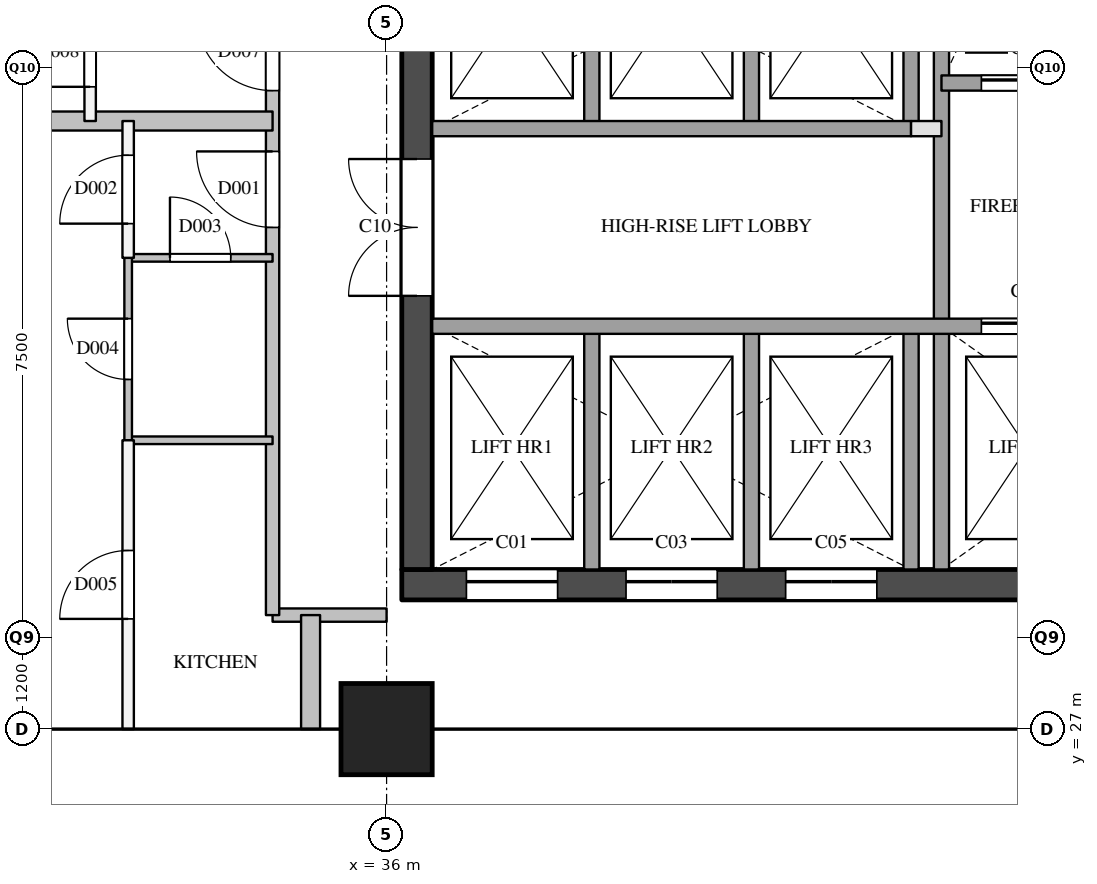
"""IFC4 building model, lengths in metres.
Left out: names, types, materials, properties, quantities, classifications, styles, units other than length and angle.
Written with IfcOpenShell. Run it as: python <this file> out.ifc"""

import sys

from ifc_helpers import new_model, si_unit, direction, frame, frame_2d, origin, origin_2d, place, context, subcontext, project, spatial, rectangle, extrude, element, fill, save


model = new_model("IFC4")
c1 = context("Model", 3, precision=1e-05, world=origin(), true_north=direction((0.0, 1.0)))
c2 = subcontext(c1, "Body", "Model", "MODEL_VIEW")
j1 = project(units=[si_unit("LENGTHUNIT", "METRE"), si_unit("PLANEANGLEUNIT", "RADIAN")], contexts=[c1])
p1 = place(None, origin())
s1 = spatial("IfcSite", under=j1, at=p1, CompositionType="ELEMENT")
p2 = place(p1, origin())
s2 = spatial("IfcBuilding", under=s1, at=p2, CompositionType="ELEMENT")
p3 = place(p2, frame((0.0, 0.0, 234.5)))
s3 = spatial("IfcBuildingStorey", under=s2, at=p3, CompositionType="ELEMENT", Elevation=234.5)
p4 = place(p3, frame((36.0, 27.0, 0.0), z_axis=(0.0, 0.0, 1.0), x_axis=(1.0, 0.0, 0.0)))
e1 = element("IfcColumn", 1, at=p4, inside=s3, PredefinedType="COLUMN", context=c2, shape_type="SweptSolid", body=[
    extrude(rectangle(XDim=1.2, YDim=1.2, at=origin_2d()), origin(), (0.0, 0.0, 1.0), 3.9),
])
p5 = place(p3, frame((36.2, 28.9, 0.0), z_axis=(0.0, 0.0, 1.0), x_axis=(1.0, 0.0, 0.0)))
e2 = element("IfcWall", 2, at=p5, inside=s3, PredefinedType="SHEAR", context=c2, shape_type="SweptSolid", body=[
    extrude(rectangle(XDim=12.0, YDim=0.4, at=frame_2d((6.0, 0.0))), origin(), (0.0, 0.0, 1.0), 3.6),
])
p6 = place(p5, frame((0.85, 0.0, 0.0)))
e3 = element("IfcOpeningElement", 3, at=p6, cuts=e2, PredefinedType="OPENING", context=c2, shape_type="SweptSolid", body=[
    extrude(rectangle(XDim=1.2, YDim=2.1, at=frame_2d((0.6, 1.05))), frame((0.0, 0.21, 0.0), z_axis=(0.0, -1.0, 0.0), x_axis=(1.0, 0.0, 0.0)), (0.0, 0.0, 1.0), 0.42),
])
p7 = place(p5, frame((2.95, 0.0, 0.0)))
e4 = element("IfcOpeningElement", 4, at=p7, cuts=e2, PredefinedType="OPENING", context=c2, shape_type="SweptSolid", body=[
    extrude(rectangle(XDim=1.2, YDim=2.1, at=frame_2d((0.6, 1.05))), frame((0.0, 0.21, 0.0), z_axis=(0.0, -1.0, 0.0), x_axis=(1.0, 0.0, 0.0)), (0.0, 0.0, 1.0), 0.42),
])
p8 = place(p5, frame((5.05, 0.0, 0.0)))
e5 = element("IfcOpeningElement", 5, at=p8, cuts=e2, PredefinedType="OPENING", context=c2, shape_type="SweptSolid", body=[
    extrude(rectangle(XDim=1.2, YDim=2.1, at=frame_2d((0.6, 1.05))), frame((0.0, 0.21, 0.0), z_axis=(0.0, -1.0, 0.0), x_axis=(1.0, 0.0, 0.0)), (0.0, 0.0, 1.0), 0.42),
])
p9 = place(p3, frame((36.4, 29.1, 0.0), z_axis=(0.0, 0.0, 1.0), x_axis=(0.0, 1.0, 0.0)))
e6 = element("IfcWall", 6, at=p9, inside=s3, PredefinedType="SHEAR", context=c2, shape_type="SweptSolid", body=[
    extrude(rectangle(XDim=20.3, YDim=0.4, at=frame_2d((10.15, 0.0))), origin(), (0.0, 0.0, 1.0), 3.6),
])
p10 = place(p9, frame((3.6, 0.0, 0.0)))
e7 = element("IfcOpeningElement", 7, at=p10, cuts=e6, PredefinedType="OPENING", context=c2, shape_type="SweptSolid", body=[
    extrude(rectangle(XDim=1.8, YDim=2.1, at=frame_2d((0.9, 1.05))), frame((0.0, 0.21, 0.0), z_axis=(0.0, -1.0, 0.0), x_axis=(1.0, 0.0, 0.0)), (0.0, 0.0, 1.0), 0.42),
])
p11 = place(p9, frame((16.4, 0.0, 0.0)))
e8 = element("IfcOpeningElement", 8, at=p11, cuts=e6, PredefinedType="OPENING", context=c2, shape_type="SweptSolid", body=[
    extrude(rectangle(XDim=1.0, YDim=2.1, at=frame_2d((0.5, 1.05))), frame((0.0, 0.21, 0.0), z_axis=(0.0, -1.0, 0.0), x_axis=(1.0, 0.0, 0.0)), (0.0, 0.0, 1.0), 0.42),
])
p12 = place(p3, frame((38.7, 29.1, 0.0), z_axis=(0.0, 0.0, 1.0), x_axis=(0.0, 1.0, 0.0)))
e9 = element("IfcWall", 9, at=p12, inside=s3, PredefinedType="SOLIDWALL", context=c2, shape_type="SweptSolid", body=[
    extrude(rectangle(XDim=3.2, YDim=0.2, at=frame_2d((1.6, 0.0))), origin(), (0.0, 0.0, 1.0), 3.6),
])
p13 = place(p3, frame((38.7, 34.9, 0.0), z_axis=(0.0, 0.0, 1.0), x_axis=(0.0, 1.0, 0.0)))
e10 = element("IfcWall", 10, at=p13, inside=s3, PredefinedType="SOLIDWALL", context=c2, shape_type="SweptSolid", body=[
    extrude(rectangle(XDim=3.2, YDim=0.2, at=frame_2d((1.6, 0.0))), origin(), (0.0, 0.0, 1.0), 3.6),
])
p14 = place(p3, frame((40.8, 29.1, 0.0), z_axis=(0.0, 0.0, 1.0), x_axis=(0.0, 1.0, 0.0)))
e11 = element("IfcWall", 11, at=p14, inside=s3, PredefinedType="SOLIDWALL", context=c2, shape_type="SweptSolid", body=[
    extrude(rectangle(XDim=3.2, YDim=0.2, at=frame_2d((1.6, 0.0))), origin(), (0.0, 0.0, 1.0), 3.6),
])
p15 = place(p3, frame((40.8, 34.9, 0.0), z_axis=(0.0, 0.0, 1.0), x_axis=(0.0, 1.0, 0.0)))
e12 = element("IfcWall", 12, at=p15, inside=s3, PredefinedType="SOLIDWALL", context=c2, shape_type="SweptSolid", body=[
    extrude(rectangle(XDim=3.2, YDim=0.2, at=frame_2d((1.6, 0.0))), origin(), (0.0, 0.0, 1.0), 3.6),
])
p16 = place(p3, frame((42.9, 29.1, 0.0), z_axis=(0.0, 0.0, 1.0), x_axis=(0.0, 1.0, 0.0)))
e13 = element("IfcWall", 13, at=p16, inside=s3, PredefinedType="SOLIDWALL", context=c2, shape_type="SweptSolid", body=[
    extrude(rectangle(XDim=3.2, YDim=0.2, at=frame_2d((1.6, 0.0))), origin(), (0.0, 0.0, 1.0), 3.6),
])
p17 = place(p3, frame((42.9, 34.9, 0.0), z_axis=(0.0, 0.0, 1.0), x_axis=(0.0, 1.0, 0.0)))
e14 = element("IfcWall", 14, at=p17, inside=s3, PredefinedType="SOLIDWALL", context=c2, shape_type="SweptSolid", body=[
    extrude(rectangle(XDim=3.2, YDim=0.2, at=frame_2d((1.6, 0.0))), origin(), (0.0, 0.0, 1.0), 3.6),
])
p18 = place(p3, frame((43.3, 29.1, 0.0), z_axis=(0.0, 0.0, 1.0), x_axis=(0.0, 1.0, 0.0)))
e15 = element("IfcWall", 15, at=p18, inside=s3, PredefinedType="SOLIDWALL", context=c2, shape_type="SweptSolid", body=[
    extrude(rectangle(XDim=9.9, YDim=0.2, at=frame_2d((4.95, 0.0))), origin(), (0.0, 0.0, 1.0), 3.6),
])
p19 = place(p3, frame((36.6, 32.3, 0.0), z_axis=(0.0, 0.0, 1.0), x_axis=(1.0, 0.0, 0.0)))
e16 = element("IfcWall", 16, at=p19, inside=s3, PredefinedType="SOLIDWALL", context=c2, shape_type="SweptSolid", body=[
    extrude(rectangle(XDim=11.2, YDim=0.2, at=frame_2d((5.6, 0.0))), origin(), (0.0, 0.0, 1.0), 3.6),
])
p20 = place(p19, frame((7.225, 0.0, 0.0)))
e17 = element("IfcOpeningElement", 17, at=p20, cuts=e16, PredefinedType="OPENING", context=c2, shape_type="SweptSolid", body=[
    extrude(rectangle(XDim=1.2, YDim=2.1, at=frame_2d((0.6, 1.05))), frame((0.0, 0.11, 0.0), z_axis=(0.0, -1.0, 0.0), x_axis=(1.0, 0.0, 0.0)), (0.0, 0.0, 1.0), 0.22),
])
p21 = place(p19, frame((9.475, 0.0, 0.0)))
e18 = element("IfcOpeningElement", 18, at=p21, cuts=e16, PredefinedType="OPENING", context=c2, shape_type="SweptSolid", body=[
    extrude(rectangle(XDim=1.2, YDim=2.1, at=frame_2d((0.6, 1.05))), frame((0.0, 0.11, 0.0), z_axis=(0.0, -1.0, 0.0), x_axis=(1.0, 0.0, 0.0)), (0.0, 0.0, 1.0), 0.22),
])
p22 = place(p3, frame((42.9, 34.9, 0.0), z_axis=(0.0, 0.0, 1.0), x_axis=(1.0, 0.0, 0.0)))
e19 = element("IfcWall", 19, at=p22, inside=s3, PredefinedType="PARTITIONING", context=c2, shape_type="SweptSolid", body=[
    extrude(rectangle(XDim=0.4, YDim=0.2, at=frame_2d((0.2, 0.0))), origin(), (0.0, 0.0, 1.0), 3.6),
])
p23 = place(p3, frame((36.6, 34.9, 0.0), z_axis=(0.0, 0.0, 1.0), x_axis=(1.0, 0.0, 0.0)))
e20 = element("IfcWall", 20, at=p23, inside=s3, PredefinedType="SOLIDWALL", context=c2, shape_type="SweptSolid", body=[
    extrude(rectangle(XDim=6.3, YDim=0.2, at=frame_2d((3.15, 0.0))), origin(), (0.0, 0.0, 1.0), 3.6),
])
p24 = place(p3, frame((43.3, 35.5, 0.0), z_axis=(0.0, 0.0, 1.0), x_axis=(1.0, 0.0, 0.0)))
e21 = element("IfcWall", 21, at=p24, inside=s3, PredefinedType="SOLIDWALL", context=c2, shape_type="SweptSolid", body=[
    extrude(rectangle(XDim=4.5, YDim=0.2, at=frame_2d((2.25, 0.0))), origin(), (0.0, 0.0, 1.0), 3.6),
])
p25 = place(p24, frame((0.525, 0.0, 0.0)))
e22 = element("IfcOpeningElement", 22, at=p25, cuts=e21, PredefinedType="OPENING", context=c2, shape_type="SweptSolid", body=[
    extrude(rectangle(XDim=1.2, YDim=2.1, at=frame_2d((0.6, 1.05))), frame((0.0, 0.11, 0.0), z_axis=(0.0, -1.0, 0.0), x_axis=(1.0, 0.0, 0.0)), (0.0, 0.0, 1.0), 0.22),
])
p26 = place(p24, frame((3.025, 0.0, 0.0)))
e23 = element("IfcOpeningElement", 23, at=p26, cuts=e21, PredefinedType="OPENING", context=c2, shape_type="SweptSolid", body=[
    extrude(rectangle(XDim=0.7, YDim=2.1, at=frame_2d((0.35, 1.05))), frame((0.0, 0.11, 0.0), z_axis=(0.0, -1.0, 0.0), x_axis=(1.0, 0.0, 0.0)), (0.0, 0.0, 1.0), 0.22),
])
p27 = place(p3, frame((34.5, 28.5, 0.0), z_axis=(0.0, 0.0, 1.0), x_axis=(1.0, 0.0, 0.0)))
e24 = element("IfcWall", 24, at=p27, inside=s3, PredefinedType="PARTITIONING", context=c2, shape_type="SweptSolid", body=[
    extrude(rectangle(XDim=1.5, YDim=0.175, at=frame_2d((0.75, 0.0))), origin(), (0.0, 0.0, 1.0), 3.6),
])
p28 = place(p3, frame((34.5, 28.5, 0.0), z_axis=(0.0, 0.0, 1.0), x_axis=(0.0, 1.0, 0.0)))
e25 = element("IfcWall", 25, at=p28, inside=s3, PredefinedType="PARTITIONING", context=c2, shape_type="SweptSolid", body=[
    extrude(rectangle(XDim=23.0, YDim=0.175, at=frame_2d((11.5, 0.0))), origin(), (0.0, 0.0, 1.0), 3.6),
])
p29 = place(p28, frame((5.1, 0.0, 0.0)))
e26 = element("IfcOpeningElement", 26, at=p29, cuts=e25, PredefinedType="OPENING", context=c2, shape_type="SweptSolid", body=[
    extrude(rectangle(XDim=1.0, YDim=2.1, at=frame_2d((0.5, 1.05))), frame((0.0, 0.097, 0.0), z_axis=(0.0, -1.0, 0.0), x_axis=(1.0, 0.0, 0.0)), (0.0, 0.0, 1.0), 0.195),
])
p30 = place(p28, frame((6.9, 0.0, 0.0)))
e27 = element("IfcOpeningElement", 27, at=p30, cuts=e25, PredefinedType="OPENING", context=c2, shape_type="SweptSolid", body=[
    extrude(rectangle(XDim=1.0, YDim=2.1, at=frame_2d((0.5, 1.05))), frame((0.0, 0.097, 0.0), z_axis=(0.0, -1.0, 0.0), x_axis=(1.0, 0.0, 0.0)), (0.0, 0.0, 1.0), 0.195),
])
p31 = place(p28, frame((16.9, 0.0, 0.0)))
e28 = element("IfcOpeningElement", 28, at=p31, cuts=e25, PredefinedType="OPENING", context=c2, shape_type="SweptSolid", body=[
    extrude(rectangle(XDim=1.0, YDim=2.1, at=frame_2d((0.5, 1.05))), frame((0.0, 0.097, 0.0), z_axis=(0.0, -1.0, 0.0), x_axis=(1.0, 0.0, 0.0)), (0.0, 0.0, 1.0), 0.195),
])
p32 = place(p3, frame((32.1, 35.0, 0.0), z_axis=(0.0, 0.0, 1.0), x_axis=(0.0, 1.0, 0.0)))
e29 = element("IfcWall", 29, at=p32, inside=s3, PredefinedType="PARTITIONING", context=c2, shape_type="SweptSolid", body=[
    extrude(rectangle(XDim=1.8, YDim=0.15, at=frame_2d((0.9, 0.0))), origin(), (0.0, 0.0, 1.0), 3.6),
])
p33 = place(p32, frame((0.45, 0.0, 0.0)))
e30 = element("IfcOpeningElement", 30, at=p33, cuts=e29, PredefinedType="OPENING", context=c2, shape_type="SweptSolid", body=[
    extrude(rectangle(XDim=0.9, YDim=2.1, at=frame_2d((0.45, 1.05))), frame((0.0, 0.085, 0.0), z_axis=(0.0, -1.0, 0.0), x_axis=(1.0, 0.0, 0.0)), (0.0, 0.0, 1.0), 0.17),
])
p34 = place(p3, frame((32.6, 27.0, 0.0), z_axis=(0.0, 0.0, 1.0), x_axis=(0.0, 1.0, 0.0)))
e31 = element("IfcWall", 31, at=p34, inside=s3, PredefinedType="PARTITIONING", context=c2, shape_type="SweptSolid", body=[
    extrude(rectangle(XDim=3.8, YDim=0.15, at=frame_2d((1.9, 0.0))), origin(), (0.0, 0.0, 1.0), 2.6),
])
p35 = place(p34, frame((1.45, 0.0, 0.0)))
e32 = element("IfcOpeningElement", 32, at=p35, cuts=e31, PredefinedType="OPENING", context=c2, shape_type="SweptSolid", body=[
    extrude(rectangle(XDim=0.9, YDim=2.1, at=frame_2d((0.45, 1.05))), frame((0.0, 0.085, 0.0), z_axis=(0.0, -1.0, 0.0), x_axis=(1.0, 0.0, 0.0)), (0.0, 0.0, 1.0), 0.17),
])
p36 = place(p3, frame((32.6, 33.2, 0.0), z_axis=(0.0, 0.0, 1.0), x_axis=(0.0, 1.0, 0.0)))
e33 = element("IfcWall", 33, at=p36, inside=s3, PredefinedType="PARTITIONING", context=c2, shape_type="SweptSolid", body=[
    extrude(rectangle(XDim=1.8, YDim=0.15, at=frame_2d((0.9, 0.0))), origin(), (0.0, 0.0, 1.0), 3.6),
])
p37 = place(p36, frame((0.45, 0.0, 0.0)))
e34 = element("IfcOpeningElement", 34, at=p37, cuts=e33, PredefinedType="OPENING", context=c2, shape_type="SweptSolid", body=[
    extrude(rectangle(XDim=0.9, YDim=2.1, at=frame_2d((0.45, 1.05))), frame((0.0, 0.085, 0.0), z_axis=(0.0, -1.0, 0.0), x_axis=(1.0, 0.0, 0.0)), (0.0, 0.0, 1.0), 0.17),
])
p38 = place(p3, frame((18.0, 35.0, 0.0), z_axis=(0.0, 0.0, 1.0), x_axis=(1.0, 0.0, 0.0)))
e35 = element("IfcWall", 35, at=p38, inside=s3, PredefinedType="PARTITIONING", context=c2, shape_type="SweptSolid", body=[
    extrude(rectangle(XDim=16.5, YDim=0.25, at=frame_2d((8.25, 0.0))), origin(), (0.0, 0.0, 1.0), 2.6),
])
p39 = place(p3, frame((35.0, 27.0, 0.0), z_axis=(0.0, 0.0, 1.0), x_axis=(0.0, 1.0, 0.0)))
e36 = element("IfcWall", 36, at=p39, inside=s3, PredefinedType="PARTITIONING", context=c2, shape_type="SweptSolid", body=[
    extrude(rectangle(XDim=1.5, YDim=0.25, at=frame_2d((0.75, 0.0))), origin(), (0.0, 0.0, 1.0), 2.6),
])
p40 = place(p3, frame((32.6, 30.8, 0.0), z_axis=(0.0, 0.0, 1.0), x_axis=(1.0, 0.0, 0.0)))
e37 = element("IfcWall", 37, at=p40, inside=s3, PredefinedType="PARTITIONING", context=c2, shape_type="SweptSolid", body=[
    extrude(rectangle(XDim=1.9, YDim=0.1, at=frame_2d((0.95, 0.0))), origin(), (0.0, 0.0, 1.0), 3.6),
])
p41 = place(p3, frame((32.6, 33.2, 0.0), z_axis=(0.0, 0.0, 1.0), x_axis=(1.0, 0.0, 0.0)))
e38 = element("IfcWall", 38, at=p41, inside=s3, PredefinedType="PARTITIONING", context=c2, shape_type="SweptSolid", body=[
    extrude(rectangle(XDim=1.9, YDim=0.1, at=frame_2d((0.95, 0.0))), origin(), (0.0, 0.0, 1.0), 3.6),
])
p42 = place(p41, frame((0.55, 0.0, 0.0)))
e39 = element("IfcOpeningElement", 39, at=p42, cuts=e38, PredefinedType="OPENING", context=c2, shape_type="SweptSolid", body=[
    extrude(rectangle(XDim=0.8, YDim=2.1, at=frame_2d((0.4, 1.05))), frame((0.0, 0.06, 0.0), z_axis=(0.0, -1.0, 0.0), x_axis=(1.0, 0.0, 0.0)), (0.0, 0.0, 1.0), 0.12),
])
p43 = place(p3, frame((32.6, 30.8, 0.0), z_axis=(0.0, 0.0, 1.0), x_axis=(0.0, 1.0, 0.0)))
e40 = element("IfcWall", 40, at=p43, inside=s3, PredefinedType="PARTITIONING", context=c2, shape_type="SweptSolid", body=[
    extrude(rectangle(XDim=2.4, YDim=0.1, at=frame_2d((1.2, 0.0))), origin(), (0.0, 0.0, 1.0), 3.6),
])
p44 = place(p43, frame((0.8, 0.0, 0.0)))
e41 = element("IfcOpeningElement", 41, at=p44, cuts=e40, PredefinedType="OPENING", context=c2, shape_type="SweptSolid", body=[
    extrude(rectangle(XDim=0.8, YDim=2.1, at=frame_2d((0.4, 1.05))), frame((0.0, 0.06, 0.0), z_axis=(0.0, -1.0, 0.0), x_axis=(1.0, 0.0, 0.0)), (0.0, 0.0, 1.0), 0.12),
])
p45 = place(p6, origin())
e42 = element("IfcDoor", 42, at=p45, inside=s3, OperationType="SLIDING_TO_LEFT", PredefinedType="DOOR", context=c2, shape_type="SweptSolid", body=[
    extrude(rectangle(XDim=1.2, YDim=2.1, at=frame_2d((0.6, 1.05))), frame((0.0, 0.025, 0.0), z_axis=(0.0, -1.0, 0.0), x_axis=(1.0, 0.0, 0.0)), (0.0, 0.0, 1.0), 0.05),
])
fill(e3, e42)
p46 = place(p7, origin())
e43 = element("IfcDoor", 43, at=p46, inside=s3, OperationType="SLIDING_TO_LEFT", PredefinedType="DOOR", context=c2, shape_type="SweptSolid", body=[
    extrude(rectangle(XDim=1.2, YDim=2.1, at=frame_2d((0.6, 1.05))), frame((0.0, 0.025, 0.0), z_axis=(0.0, -1.0, 0.0), x_axis=(1.0, 0.0, 0.0)), (0.0, 0.0, 1.0), 0.05),
])
fill(e4, e43)
p47 = place(p8, origin())
e44 = element("IfcDoor", 44, at=p47, inside=s3, OperationType="SLIDING_TO_LEFT", PredefinedType="DOOR", context=c2, shape_type="SweptSolid", body=[
    extrude(rectangle(XDim=1.2, YDim=2.1, at=frame_2d((0.6, 1.05))), frame((0.0, 0.025, 0.0), z_axis=(0.0, -1.0, 0.0), x_axis=(1.0, 0.0, 0.0)), (0.0, 0.0, 1.0), 0.05),
])
fill(e5, e44)
p48 = place(p20, origin())
e45 = element("IfcDoor", 45, at=p48, inside=s3, OperationType="SLIDING_TO_LEFT", PredefinedType="DOOR", context=c2, shape_type="SweptSolid", body=[
    extrude(rectangle(XDim=1.2, YDim=2.1, at=frame_2d((0.6, 1.05))), frame((0.0, 0.025, 0.0), z_axis=(0.0, -1.0, 0.0), x_axis=(1.0, 0.0, 0.0)), (0.0, 0.0, 1.0), 0.05),
])
fill(e17, e45)
p49 = place(p25, origin())
e46 = element("IfcDoor", 46, at=p49, inside=s3, OperationType="SLIDING_TO_LEFT", PredefinedType="DOOR", context=c2, shape_type="SweptSolid", body=[
    extrude(rectangle(XDim=1.2, YDim=2.1, at=frame_2d((0.6, 1.05))), frame((0.0, 0.025, 0.0), z_axis=(0.0, -1.0, 0.0), x_axis=(1.0, 0.0, 0.0)), (0.0, 0.0, 1.0), 0.05),
])
fill(e22, e46)
p50 = place(p10, origin())
e47 = element("IfcDoor", 47, at=p50, inside=s3, OperationType="DOUBLE_DOOR_SINGLE_SWING", PredefinedType="DOOR", context=c2, shape_type="SweptSolid", body=[
    extrude(rectangle(XDim=1.8, YDim=2.1, at=frame_2d((0.9, 1.05))), frame((0.0, 0.025, 0.0), z_axis=(0.0, -1.0, 0.0), x_axis=(1.0, 0.0, 0.0)), (0.0, 0.0, 1.0), 0.05),
])
fill(e7, e47)
p51 = place(p29, origin())
e48 = element("IfcDoor", 48, at=p51, inside=s3, OperationType="SINGLE_SWING_RIGHT", PredefinedType="DOOR", context=c2, shape_type="SweptSolid", body=[
    extrude(rectangle(XDim=1.0, YDim=2.1, at=frame_2d((0.5, 1.05))), frame((0.0, 0.025, 0.0), z_axis=(0.0, -1.0, 0.0), x_axis=(1.0, 0.0, 0.0)), (0.0, 0.0, 1.0), 0.05),
])
fill(e26, e48)
p52 = place(p37, origin())
e49 = element("IfcDoor", 49, at=p52, inside=s3, OperationType="SINGLE_SWING_LEFT", PredefinedType="DOOR", context=c2, shape_type="SweptSolid", body=[
    extrude(rectangle(XDim=0.9, YDim=2.1, at=frame_2d((0.45, 1.05))), frame((0.0, 0.025, 0.0), z_axis=(0.0, -1.0, 0.0), x_axis=(1.0, 0.0, 0.0)), (0.0, 0.0, 1.0), 0.05),
])
fill(e34, e49)
p53 = place(p42, origin())
e50 = element("IfcDoor", 50, at=p53, inside=s3, OperationType="SINGLE_SWING_LEFT", PredefinedType="DOOR", context=c2, shape_type="SweptSolid", body=[
    extrude(rectangle(XDim=0.8, YDim=2.1, at=frame_2d((0.4, 1.05))), frame((0.0, 0.025, 0.0), z_axis=(0.0, -1.0, 0.0), x_axis=(1.0, 0.0, 0.0)), (0.0, 0.0, 1.0), 0.05),
])
fill(e39, e50)
p54 = place(p44, origin())
e51 = element("IfcDoor", 51, at=p54, inside=s3, OperationType="SINGLE_SWING_RIGHT", PredefinedType="DOOR", context=c2, shape_type="SweptSolid", body=[
    extrude(rectangle(XDim=0.8, YDim=2.1, at=frame_2d((0.4, 1.05))), frame((0.0, 0.025, 0.0), z_axis=(0.0, -1.0, 0.0), x_axis=(1.0, 0.0, 0.0)), (0.0, 0.0, 1.0), 0.05),
])
fill(e41, e51)
p55 = place(p35, origin())
e52 = element("IfcDoor", 52, at=p55, inside=s3, OperationType="SINGLE_SWING_LEFT", PredefinedType="DOOR", context=c2, shape_type="SweptSolid", body=[
    extrude(rectangle(XDim=0.9, YDim=2.1, at=frame_2d((0.45, 1.05))), frame((0.0, 0.025, 0.0), z_axis=(0.0, -1.0, 0.0), x_axis=(1.0, 0.0, 0.0)), (0.0, 0.0, 1.0), 0.05),
])
fill(e32, e52)
p56 = place(p30, origin())
e53 = element("IfcDoor", 53, at=p56, inside=s3, OperationType="SINGLE_SWING_RIGHT", PredefinedType="DOOR", context=c2, shape_type="SweptSolid", body=[
    extrude(rectangle(XDim=1.0, YDim=2.1, at=frame_2d((0.5, 1.05))), frame((0.0, 0.025, 0.0), z_axis=(0.0, -1.0, 0.0), x_axis=(1.0, 0.0, 0.0)), (0.0, 0.0, 1.0), 0.05),
])
fill(e27, e53)
p57 = place(p33, origin())
e54 = element("IfcDoor", 54, at=p57, inside=s3, OperationType="SINGLE_SWING_LEFT", PredefinedType="DOOR", context=c2, shape_type="SweptSolid", body=[
    extrude(rectangle(XDim=0.9, YDim=2.1, at=frame_2d((0.45, 1.05))), frame((0.0, 0.025, 0.0), z_axis=(0.0, -1.0, 0.0), x_axis=(1.0, 0.0, 0.0)), (0.0, 0.0, 1.0), 0.05),
])
fill(e30, e54)
save(model, sys.argv[1])
